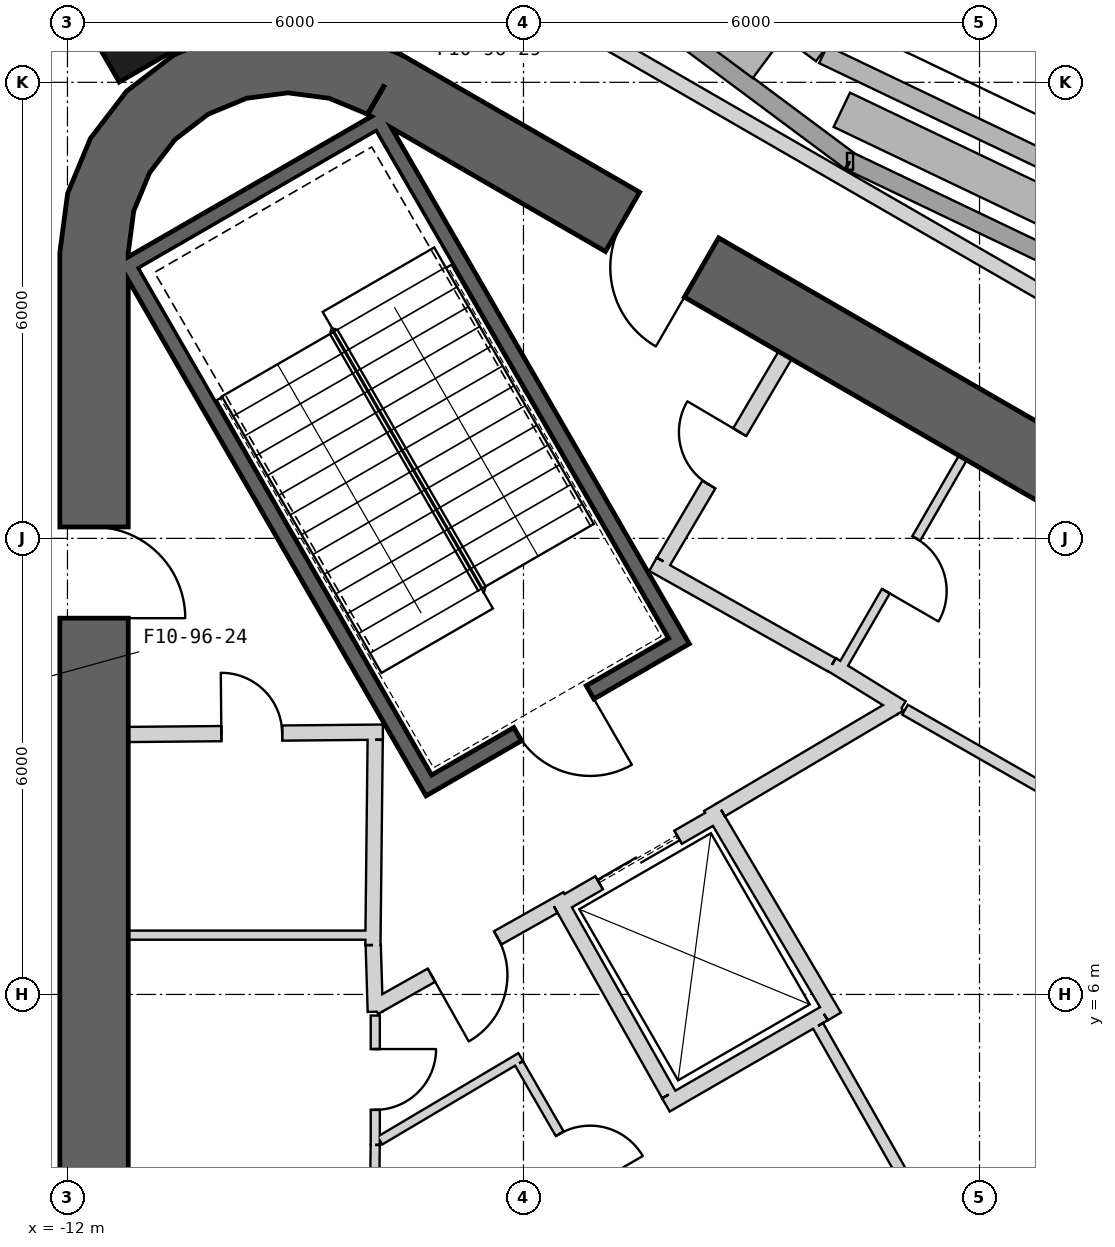
"""IFC4 building model, lengths in metres.
Left out: names, types, materials, properties, quantities, classifications, styles, units other than length and angle.
Written with IfcOpenShell. Run it as: python <this file> out.ifc"""

import sys

from ifc_helpers import new_model, si_unit, direction, frame, frame_2d, origin, origin_2d, place, context, subcontext, project, spatial, polyline, rectangle, outline, extrude, element, fill, save


model = new_model("IFC4")
c1 = context("Model", 3, precision=1e-05, world=origin(), true_north=direction((0.0, 1.0)))
c2 = subcontext(c1, "Body", "Model", "MODEL_VIEW")
j1 = project(units=[si_unit("LENGTHUNIT", "METRE"), si_unit("PLANEANGLEUNIT", "RADIAN")], contexts=[c1])
p1 = place(None, origin())
s1 = spatial("IfcSite", under=j1, at=p1, CompositionType="ELEMENT")
p2 = place(p1, origin())
s2 = spatial("IfcBuilding", under=s1, at=p2, CompositionType="ELEMENT")
p3 = place(p2, frame((0.0, 0.0, 425.3)))
s3 = spatial("IfcBuildingStorey", under=s2, at=p3, CompositionType="ELEMENT", Elevation=425.3)
p4 = place(p3, frame((-11.025, 19.097, -0.25), z_axis=(0.0, 0.0, 1.0), x_axis=(-0.5, 0.866025403784, 0.0)))
e1 = element("IfcColumn", 1, at=p4, inside=s3, PredefinedType="COLUMN", context=c2, shape_type="SweptSolid", body=[
    extrude(rectangle(XDim=1.6, YDim=1.6, at=origin_2d()), origin(), (0.0, 0.0, 1.0), 5.25),
])
p5 = place(p3, frame((19.475, 2.208, 0.0), z_axis=(0.0, 0.0, 1.0), x_axis=(-0.866028369851, 0.499994862586, 0.0)))
e2 = element("IfcWall", 2, at=p5, inside=s3, PredefinedType="SHEAR", context=c2, shape_type="SweptSolid", body=[
    extrude(rectangle(XDim=31.523, YDim=0.9, at=frame_2d((15.762, 0.0))), origin(), (0.0, 0.0, 1.0), 5.0),
])
p6 = place(p5, frame((3.612, 0.0, 0.0)))
e3 = element("IfcOpeningElement", 3, at=p6, cuts=e2, PredefinedType="OPENING", context=c2, shape_type="SweptSolid", body=[
    extrude(rectangle(XDim=1.2, YDim=2.4, at=frame_2d((0.6, 1.2))), frame((0.0, 0.46, 0.0), z_axis=(0.0, -1.0, 0.0), x_axis=(1.0, 0.0, 0.0)), (0.0, 0.0, 1.0), 0.92),
])
p7 = place(p5, frame((26.712, 0.0, 0.0)))
e4 = element("IfcOpeningElement", 4, at=p7, cuts=e2, PredefinedType="OPENING", context=c2, shape_type="SweptSolid", body=[
    extrude(rectangle(XDim=1.2, YDim=2.4, at=frame_2d((0.6, 1.2))), frame((0.0, 0.46, 0.0), z_axis=(0.0, -1.0, 0.0), x_axis=(1.0, 0.0, 0.0)), (0.0, 0.0, 1.0), 0.92),
])
p8 = place(p3, frame((-11.65, 15.762, 0.0), z_axis=(0.0, 0.0, 1.0), x_axis=(0.0, -1.0, 0.0)))
e5 = element("IfcWall", 5, at=p8, inside=s3, PredefinedType="SHEAR", context=c2, shape_type="SweptSolid", body=[
    extrude(rectangle(XDim=31.523, YDim=0.9, at=frame_2d((15.762, 0.0))), origin(), (0.0, 0.0, 1.0), 5.0),
])
p9 = place(p8, frame((3.612, 0.0, 0.0)))
e6 = element("IfcOpeningElement", 6, at=p9, cuts=e5, PredefinedType="OPENING", context=c2, shape_type="SweptSolid", body=[
    extrude(rectangle(XDim=1.2, YDim=2.4, at=frame_2d((0.6, 1.2))), frame((0.0, 0.46, 0.0), z_axis=(0.0, -1.0, 0.0), x_axis=(1.0, 0.0, 0.0)), (0.0, 0.0, 1.0), 0.92),
])
p10 = place(p8, frame((26.712, 0.0, 0.0)))
e7 = element("IfcOpeningElement", 7, at=p10, cuts=e5, PredefinedType="OPENING", context=c2, shape_type="SweptSolid", body=[
    extrude(rectangle(XDim=1.2, YDim=2.4, at=frame_2d((0.6, 1.2))), frame((0.0, 0.46, 0.0), z_axis=(0.0, -1.0, 0.0), x_axis=(1.0, 0.0, 0.0)), (0.0, 0.0, 1.0), 0.92),
])
p11 = place(p3, origin())
e8 = element("IfcWall", 8, at=p11, inside=s3, PredefinedType="SHEAR", context=c2, shape_type="SweptSolid", body=[
    extrude(outline(polyline([(-7.6, 18.36), (-8.323, 18.659), (-9.1, 18.762), (-9.876, 18.659), (-10.6, 18.36), (-11.221, 17.883), (-11.698, 17.262), (-11.998, 16.538), (-12.1, 15.762), (-11.2, 15.762), (-11.128, 16.305), (-10.919, 16.812), (-10.585, 17.247), (-10.15, 17.58), (-9.644, 17.79), (-9.1, 17.862), (-8.556, 17.79), (-8.05, 17.58), (-7.6, 18.36)])), origin(), (0.0, 0.0, 1.0), 5.0),
])
p12 = place(p3, frame((4.314, 14.085, 0.0), z_axis=(0.0, 0.0, 1.0), x_axis=(-0.902315049727, 0.431077198464, 0.0)))
e9 = element("IfcWall", 9, at=p12, inside=s3, PredefinedType="SOLIDWALL", context=c2, shape_type="SweptSolid", body=[
    extrude(rectangle(XDim=6.669, YDim=0.24, at=frame_2d((3.334, 0.0))), origin(), (0.0, 0.0, 1.0), 4.75),
])
p13 = place(p3, frame((-1.703, 16.96, 0.0), z_axis=(0.0, 0.0, 1.0), x_axis=(-0.801994232546, 0.597331776288, 0.0)))
e10 = element("IfcWall", 10, at=p13, inside=s3, PredefinedType="SOLIDWALL", context=c2, shape_type="SweptSolid", body=[
    extrude(rectangle(XDim=6.669, YDim=0.24, at=frame_2d((3.335, 0.0))), origin(), (0.0, 0.0, 1.0), 4.75),
])
p14 = place(p3, frame((-12.094, 20.946, 0.0), z_axis=(0.0, 0.0, 1.0), x_axis=(-0.498950155725, -0.866630683799, 0.0)))
e11 = element("IfcWall", 11, at=p14, inside=s3, PredefinedType="SOLIDWALL", context=c2, shape_type="SweptSolid", body=[
    extrude(rectangle(XDim=5.055, YDim=0.24, at=frame_2d((2.527, 0.0))), origin(), (0.0, 0.0, 1.0), 4.75),
])
p15 = place(p3, frame((-7.914, 22.725, 0.04), z_axis=(0.0, 0.0, 1.0), x_axis=(0.801984295915, -0.597345117253, 0.0)))
e12 = element("IfcWall", 12, at=p15, inside=s3, PredefinedType="PARAPET", context=c2, shape_type="SweptSolid", body=[
    extrude(rectangle(XDim=7.278, YDim=0.25, at=frame_2d((3.639, 0.0))), origin(), (0.0, 0.0, 1.0), 1.2),
])
p16 = place(p3, frame((-2.057, 18.365, 0.04), z_axis=(0.0, 0.0, 1.0), x_axis=(0.90231764466, -0.431071766804, 0.0)))
e13 = element("IfcWall", 13, at=p16, inside=s3, PredefinedType="PARAPET", context=c2, shape_type="SweptSolid", body=[
    extrude(rectangle(XDim=21.975, YDim=0.25, at=frame_2d((10.987, 0.0))), origin(), (0.0, 0.0, 1.0), 1.2),
])
p17 = place(p3, frame((-7.696, 21.877, 0.04), z_axis=(0.0, 0.0, 1.0), x_axis=(0.801981944101, -0.597348274741, 0.0)))
e14 = element("IfcWall", 14, at=p17, inside=s3, PredefinedType="PARAPET", context=c2, shape_type="SweptSolid", body=[
    extrude(rectangle(XDim=6.062, YDim=0.5, at=frame_2d((3.031, 0.0))), origin(), (0.0, 0.0, 1.0), 0.6),
])
p18 = place(p3, frame((-1.812, 17.639, 0.04), z_axis=(0.0, 0.0, 1.0), x_axis=(0.902316498724, -0.431074165463, 0.0)))
e15 = element("IfcWall", 15, at=p18, inside=s3, PredefinedType="PARAPET", context=c2, shape_type="SweptSolid", body=[
    extrude(rectangle(XDim=20.799, YDim=0.5, at=frame_2d((10.399, 0.0))), origin(), (0.0, 0.0, 1.0), 0.6),
])
p19 = place(p3, frame((-11.245, 15.678, -0.25), z_axis=(0.0, 0.0, 1.0), x_axis=(0.499977274689, -0.866038523851, 0.0)))
e16 = element("IfcWall", 16, at=p19, inside=s3, PredefinedType="SHEAR", context=c2, shape_type="SweptSolid", body=[
    extrude(rectangle(XDim=8.1, YDim=0.2, at=frame_2d((4.05, 0.0))), origin(), (0.0, 0.0, 1.0), 5.0),
])
p20 = place(p3, frame((-7.818, 17.541, -0.25), z_axis=(0.0, 0.0, 1.0), x_axis=(-0.866044365799, -0.499967155389, 0.0)))
e17 = element("IfcWall", 17, at=p20, inside=s3, PredefinedType="SHEAR", context=c2, shape_type="SweptSolid", body=[
    extrude(rectangle(XDim=3.8, YDim=0.2, at=frame_2d((1.9, 0.0))), origin(), (0.0, 0.0, 1.0), 5.0),
])
p21 = place(p3, frame((-7.854, 17.405, -0.25), z_axis=(0.0, 0.0, 1.0), x_axis=(0.499997992926, -0.866026562566, 0.0)))
e18 = element("IfcWall", 18, at=p21, inside=s3, PredefinedType="SHEAR", context=c2, shape_type="SweptSolid", body=[
    extrude(rectangle(XDim=7.9, YDim=0.2, at=frame_2d((3.95, 0.0))), origin(), (0.0, 0.0, 1.0), 5.0),
])
p22 = place(p3, frame((-7.159, 8.8, -0.25), z_axis=(0.0, 0.0, 1.0), x_axis=(0.866047807691, 0.499961193289, 0.0)))
e19 = element("IfcWall", 19, at=p22, inside=s3, PredefinedType="SHEAR", context=c2, shape_type="SweptSolid", body=[
    extrude(rectangle(XDim=3.6, YDim=0.2, at=frame_2d((1.8, 0.0))), origin(), (0.0, 0.0, 1.0), 5.0),
])
p23 = place(p22, frame((1.25, 0.0, 0.25)))
e20 = element("IfcOpeningElement", 20, at=p23, cuts=e19, PredefinedType="OPENING", context=c2, shape_type="SweptSolid", body=[
    extrude(rectangle(XDim=1.1, YDim=2.1, at=frame_2d((0.55, 1.05))), frame((0.0, 0.11, 0.0), z_axis=(0.0, -1.0, 0.0), x_axis=(1.0, 0.0, 0.0)), (0.0, 0.0, 1.0), 0.22),
])
p24 = place(p3, frame((-5.524, 7.168, 0.0), z_axis=(0.0, 0.0, 1.0), x_axis=(0.866024647952, 0.500001309137, 0.0)))
e21 = element("IfcWall", 21, at=p24, inside=s3, PredefinedType="PLUMBINGWALL", context=c2, shape_type="SweptSolid", body=[
    extrude(rectangle(XDim=2.4, YDim=0.2, at=frame_2d((1.2, 0.0))), origin(), (0.0, 0.0, 1.0), 4.75),
])
p25 = place(p24, frame((0.6, 0.0, 0.0)))
e22 = element("IfcOpeningElement", 22, at=p25, cuts=e21, PredefinedType="OPENING", context=c2, shape_type="SweptSolid", body=[
    extrude(rectangle(XDim=1.2, YDim=2.4, at=frame_2d((0.6, 1.2))), frame((0.0, 0.11, 0.0), z_axis=(0.0, -1.0, 0.0), x_axis=(1.0, 0.0, 0.0)), (0.0, 0.0, 1.0), 0.22),
])
p26 = place(p3, frame((-3.538, 8.465, 0.0), z_axis=(0.0, 0.0, 1.0), x_axis=(0.508616218331, -0.860993346345, 0.0)))
e23 = element("IfcWall", 23, at=p26, inside=s3, PredefinedType="PLUMBINGWALL", context=c2, shape_type="SweptSolid", body=[
    extrude(rectangle(XDim=3.2, YDim=0.2, at=frame_2d((1.6, 0.0))), origin(), (0.0, 0.0, 1.0), 4.75),
])
p27 = place(p3, frame((-2.047, 5.746, 0.0), z_axis=(0.0, 0.0, 1.0), x_axis=(-0.866024647952, -0.500001309137, 0.0)))
e24 = element("IfcWall", 24, at=p27, inside=s3, PredefinedType="PLUMBINGWALL", context=c2, shape_type="SweptSolid", body=[
    extrude(rectangle(XDim=2.4, YDim=0.2, at=frame_2d((1.2, 0.0))), origin(), (0.0, 0.0, 1.0), 4.75),
])
p28 = place(p3, frame((-5.562, 7.296, 0.0), z_axis=(0.0, 0.0, 1.0), x_axis=(0.49134651263, -0.870964180966, 0.0)))
e25 = element("IfcWall", 25, at=p28, inside=s3, PredefinedType="PLUMBINGWALL", context=c2, shape_type="SweptSolid", body=[
    extrude(rectangle(XDim=3.0, YDim=0.2, at=frame_2d((1.5, 0.0))), origin(), (0.0, 0.0, 1.0), 4.75),
])
p29 = place(p3, frame((-7.95, 6.78, 0.0), z_axis=(0.0, 0.0, 1.0), x_axis=(-1.0, 0.0, 0.0)))
e26 = element("IfcWall", 26, at=p29, inside=s3, PredefinedType="PARTITIONING", context=c2, shape_type="SweptSolid", body=[
    extrude(rectangle(XDim=3.25, YDim=0.12, at=frame_2d((1.625, 0.0))), origin(), (0.0, 0.0, 1.0), 4.75),
])
p30 = place(p3, frame((-7.85, 9.451, 0.0), z_axis=(0.0, 0.0, 1.0), x_axis=(-0.999957167047, -0.009255488683, 0.0)))
e27 = element("IfcWall", 27, at=p30, inside=s3, PredefinedType="PARTITIONING", context=c2, shape_type="SweptSolid", body=[
    extrude(rectangle(XDim=3.35, YDim=0.2, at=frame_2d((1.675, 0.0))), origin(), (0.0, 0.0, 1.0), 4.75),
])
p31 = place(p30, frame((1.325, 0.0, 0.0)))
e28 = element("IfcOpeningElement", 28, at=p31, cuts=e27, PredefinedType="OPENING", context=c2, shape_type="SweptSolid", body=[
    extrude(rectangle(XDim=0.8, YDim=2.1, at=frame_2d((0.4, 1.05))), frame((0.0, 0.11, 0.0), z_axis=(0.0, -1.0, 0.0), x_axis=(1.0, 0.0, 0.0)), (0.0, 0.0, 1.0), 0.22),
])
p32 = place(p3, frame((-7.981, 6.65, 0.0), z_axis=(0.0, 0.0, 1.0), x_axis=(0.011120469654, 0.999938165666, 0.0)))
e29 = element("IfcWall", 29, at=p32, inside=s3, PredefinedType="PARTITIONING", context=c2, shape_type="SweptSolid", body=[
    extrude(rectangle(XDim=2.7, YDim=0.2, at=frame_2d((1.35, 0.0))), origin(), (0.0, 0.0, 1.0), 4.75),
])
p33 = place(p3, frame((-7.95, 5.772, 0.0), z_axis=(0.0, 0.0, 1.0), x_axis=(-0.030861509705, 0.999523670164, 0.0)))
e30 = element("IfcWall", 30, at=p33, inside=s3, PredefinedType="PARTITIONING", context=c2, shape_type="SweptSolid", body=[
    extrude(rectangle(XDim=0.878, YDim=0.2, at=frame_2d((0.439, 0.0))), origin(), (0.0, 0.0, 1.0), 4.75),
])
p34 = place(p3, frame((-7.951, 4.02, 0.0), z_axis=(0.0, 0.0, 1.0), x_axis=(-0.010879853406, -0.999940812643, 0.0)))
e31 = element("IfcWall", 31, at=p34, inside=s3, PredefinedType="PARTITIONING", context=c2, shape_type="SweptSolid", body=[
    extrude(rectangle(XDim=2.67, YDim=0.12, at=frame_2d((1.335, 0.0))), origin(), (0.0, 0.0, 1.0), 4.75),
])
p35 = place(p3, frame((-7.95, 4.02, 0.0), z_axis=(0.0, 0.0, 1.0), x_axis=(0.0, 1.0, 0.0)))
e32 = element("IfcWall", 32, at=p35, inside=s3, PredefinedType="PARTITIONING", context=c2, shape_type="SweptSolid", body=[
    extrude(rectangle(XDim=1.702, YDim=0.12, at=frame_2d((0.851, 0.0))), origin(), (0.0, 0.0, 1.0), 4.75),
])
p36 = place(p35, frame((0.461, 0.0, 0.0)))
e33 = element("IfcOpeningElement", 33, at=p36, cuts=e32, PredefinedType="OPENING", context=c2, shape_type="SweptSolid", body=[
    extrude(rectangle(XDim=0.8, YDim=2.1, at=frame_2d((0.4, 1.05))), frame((0.0, 0.07, 0.0), z_axis=(0.0, -1.0, 0.0), x_axis=(1.0, 0.0, 0.0)), (0.0, 0.0, 1.0), 0.14),
])
p37 = place(p3, frame((-0.22, 13.06, 0.0), z_axis=(0.0, 0.0, 1.0), x_axis=(-0.499984717929, -0.866034226713, 0.0)))
e34 = element("IfcWall", 34, at=p37, inside=s3, PredefinedType="PARTITIONING", context=c2, shape_type="SweptSolid", body=[
    extrude(rectangle(XDim=3.25, YDim=0.12, at=frame_2d((1.625, 0.0))), origin(), (0.0, 0.0, 1.0), 4.75),
])
p38 = place(p37, frame((1.225, 0.0, 0.0)))
e35 = element("IfcOpeningElement", 35, at=p38, cuts=e34, PredefinedType="OPENING", context=c2, shape_type="SweptSolid", body=[
    extrude(rectangle(XDim=0.8, YDim=2.1, at=frame_2d((0.4, 1.05))), frame((0.0, 0.07, 0.0), z_axis=(0.0, -1.0, 0.0), x_axis=(1.0, 0.0, 0.0)), (0.0, 0.0, 1.0), 0.14),
])
p39 = place(p3, frame((-1.941, 10.339, 0.0), z_axis=(0.0, 0.0, 1.0), x_axis=(0.850216889117, -0.526432561171, 0.0)))
e36 = element("IfcWall", 36, at=p39, inside=s3, PredefinedType="PARTITIONING", context=c2, shape_type="SweptSolid", body=[
    extrude(rectangle(XDim=1.078, YDim=0.2, at=frame_2d((0.539, 0.0))), origin(), (0.0, 0.0, 1.0), 4.75),
])
p40 = place(p3, frame((5.159, 6.236, 0.0), z_axis=(0.0, 0.0, 1.0), x_axis=(-0.868105023632, 0.496380567654, 0.0)))
e37 = element("IfcWall", 37, at=p40, inside=s3, PredefinedType="PLUMBINGWALL", context=c2, shape_type="SweptSolid", body=[
    extrude(rectangle(XDim=7.072, YDim=0.15, at=frame_2d((3.536, 0.0))), origin(), (0.0, 0.0, 1.0), 4.75),
])
p41 = place(p3, frame((-4.296, 11.659, 0.0), z_axis=(0.0, 0.0, 1.0), x_axis=(0.871534483978, -0.490334215854, 0.0)))
e38 = element("IfcWall", 38, at=p41, inside=s3, PredefinedType="PARTITIONING", context=c2, shape_type="SweptSolid", body=[
    extrude(rectangle(XDim=2.7, YDim=0.2, at=frame_2d((1.35, 0.0))), origin(), (0.0, 0.0, 1.0), 4.75),
])
p42 = place(p3, frame((-2.558, 14.409, 0.0), z_axis=(0.0, 0.0, 1.0), x_axis=(-0.508018930956, -0.861345903683, 0.0)))
e39 = element("IfcWall", 39, at=p42, inside=s3, PredefinedType="PARTITIONING", context=c2, shape_type="SweptSolid", body=[
    extrude(rectangle(XDim=3.15, YDim=0.2, at=frame_2d((1.575, 0.0))), origin(), (0.0, 0.0, 1.0), 4.75),
])
p43 = place(p42, frame((1.175, 0.0, 0.0)))
e40 = element("IfcOpeningElement", 40, at=p43, cuts=e39, PredefinedType="OPENING", context=c2, shape_type="SweptSolid", body=[
    extrude(rectangle(XDim=0.8, YDim=2.1, at=frame_2d((0.4, 1.05))), frame((0.0, 0.11, 0.0), z_axis=(0.0, -1.0, 0.0), x_axis=(1.0, 0.0, 0.0)), (0.0, 0.0, 1.0), 0.22),
])
p44 = place(p3, frame((-1.055, 9.818, 0.0), z_axis=(0.0, 0.0, 1.0), x_axis=(-0.860614334655, -0.50925726994, 0.0)))
e41 = element("IfcWall", 41, at=p44, inside=s3, PredefinedType="PARTITIONING", context=c2, shape_type="SweptSolid", body=[
    extrude(rectangle(XDim=2.726, YDim=0.2, at=frame_2d((1.363, 0.0))), origin(), (0.0, 0.0, 1.0), 4.75),
])
p45 = place(p3, frame((-5.6, 7.16, 0.0), z_axis=(0.0, 0.0, 1.0), x_axis=(-0.871337173459, -0.490684756385, 0.0)))
e42 = element("IfcWall", 42, at=p45, inside=s3, PredefinedType="PARTITIONING", context=c2, shape_type="SweptSolid", body=[
    extrude(rectangle(XDim=2.709, YDim=0.2, at=frame_2d((1.354, 0.0))), origin(), (0.0, 0.0, 1.0), 4.75),
])
p46 = place(p45, frame((0.848, 0.0, 0.0)))
e43 = element("IfcOpeningElement", 43, at=p46, cuts=e42, PredefinedType="OPENING", context=c2, shape_type="SweptSolid", body=[
    extrude(rectangle(XDim=1.0, YDim=2.1, at=frame_2d((0.5, 1.05))), frame((0.0, 0.11, 0.0), z_axis=(0.0, -1.0, 0.0), x_axis=(1.0, 0.0, 0.0)), (0.0, 0.0, 1.0), 0.22),
])
p47 = place(p3, frame((-2.124, 5.586, 0.0), z_axis=(0.0, 0.0, 1.0), x_axis=(0.494084527552, -0.869413871314, 0.0)))
e44 = element("IfcWall", 44, at=p47, inside=s3, PredefinedType="PLUMBINGWALL", context=c2, shape_type="SweptSolid", body=[
    extrude(rectangle(XDim=4.188, YDim=0.15, at=frame_2d((2.094, 0.0))), origin(), (0.0, 0.0, 1.0), 4.75),
])
p48 = place(p3, frame((-6.037, 5.176, 0.0), z_axis=(0.0, 0.0, 1.0), x_axis=(-0.860081621619, -0.510156450663, 0.0)))
e45 = element("IfcWall", 45, at=p48, inside=s3, PredefinedType="PARTITIONING", context=c2, shape_type="SweptSolid", body=[
    extrude(rectangle(XDim=2.155, YDim=0.12, at=frame_2d((1.077, 0.0))), origin(), (0.0, 0.0, 1.0), 4.75),
])
p49 = place(p3, frame((-4.558, 2.495, 0.0), z_axis=(0.0, 0.0, 1.0), x_axis=(-0.499990139034, 0.866031096941, 0.0)))
e46 = element("IfcWall", 46, at=p49, inside=s3, PredefinedType="PARTITIONING", context=c2, shape_type="SweptSolid", body=[
    extrude(rectangle(XDim=3.0, YDim=0.12, at=frame_2d((1.5, 0.0))), origin(), (0.0, 0.0, 1.0), 4.75),
])
p50 = place(p49, frame((1.13, 0.0, 0.0)))
e47 = element("IfcOpeningElement", 47, at=p50, cuts=e46, PredefinedType="OPENING", context=c2, shape_type="SweptSolid", body=[
    extrude(rectangle(XDim=0.8, YDim=2.1, at=frame_2d((0.4, 1.05))), frame((0.0, 0.07, 0.0), z_axis=(0.0, -1.0, 0.0), x_axis=(1.0, 0.0, 0.0)), (0.0, 0.0, 1.0), 0.14),
])
p51 = place(p3, frame((4.034, 13.375, 0.0), z_axis=(0.0, 0.0, 1.0), x_axis=(-0.866024064453, 0.500002319783, 0.0)))
e48 = element("IfcWall", 48, at=p51, inside=s3, PredefinedType="PARTITIONING", context=c2, shape_type="SweptSolid", body=[
    extrude(rectangle(XDim=12.812, YDim=0.2, at=frame_2d((6.406, 0.0))), origin(), (0.0, 0.0, 1.0), 4.75),
])
p52 = place(p51, frame((11.612, 0.0, 0.0)))
e49 = element("IfcOpeningElement", 49, at=p52, cuts=e48, PredefinedType="OPENING", context=c2, shape_type="SweptSolid", body=[
    extrude(rectangle(XDim=1.0, YDim=2.1, at=frame_2d((0.5, 1.05))), frame((0.0, 0.11, 0.0), z_axis=(0.0, -1.0, 0.0), x_axis=(1.0, 0.0, 0.0)), (0.0, 0.0, 1.0), 0.22),
])
p53 = place(p23, origin())
e50 = element("IfcDoor", 50, at=p53, inside=s3, OperationType="SINGLE_SWING_RIGHT", PredefinedType="USERDEFINED", context=c2, shape_type="SweptSolid", body=[
    extrude(rectangle(XDim=1.1, YDim=2.1, at=frame_2d((0.55, 1.05))), frame((0.0, 0.025, 0.0), z_axis=(0.0, -1.0, 0.0), x_axis=(1.0, 0.0, 0.0)), (0.0, 0.0, 1.0), 0.05),
])
fill(e20, e50)
p54 = place(p46, origin())
e51 = element("IfcDoor", 51, at=p54, inside=s3, OperationType="SINGLE_SWING_RIGHT", PredefinedType="USERDEFINED", context=c2, shape_type="SweptSolid", body=[
    extrude(rectangle(XDim=1.0, YDim=2.1, at=frame_2d((0.5, 1.05))), frame((0.0, 0.025, 0.0), z_axis=(0.0, -1.0, 0.0), x_axis=(1.0, 0.0, 0.0)), (0.0, 0.0, 1.0), 0.05),
])
fill(e43, e51)
p55 = place(p25, origin())
e52 = element("IfcDoor", 52, at=p55, inside=s3, OperationType="SLIDING_TO_LEFT", PredefinedType="USERDEFINED", context=c2, shape_type="SweptSolid", body=[
    extrude(rectangle(XDim=1.2, YDim=2.4, at=frame_2d((0.6, 1.2))), frame((0.0, 0.025, 0.0), z_axis=(0.0, -1.0, 0.0), x_axis=(1.0, 0.0, 0.0)), (0.0, 0.0, 1.0), 0.05),
])
fill(e22, e52)
p56 = place(p50, origin())
e53 = element("IfcDoor", 53, at=p56, inside=s3, OperationType="SINGLE_SWING_LEFT", PredefinedType="USERDEFINED", context=c2, shape_type="SweptSolid", body=[
    extrude(rectangle(XDim=0.8, YDim=2.1, at=frame_2d((0.4, 1.05))), frame((0.0, 0.025, 0.0), z_axis=(0.0, -1.0, 0.0), x_axis=(1.0, 0.0, 0.0)), (0.0, 0.0, 1.0), 0.05),
])
fill(e47, e53)
p57 = place(p31, origin())
e54 = element("IfcDoor", 54, at=p57, inside=s3, OperationType="SINGLE_SWING_RIGHT", PredefinedType="USERDEFINED", context=c2, shape_type="SweptSolid", body=[
    extrude(rectangle(XDim=0.8, YDim=2.1, at=frame_2d((0.4, 1.05))), frame((0.0, 0.025, 0.0), z_axis=(0.0, -1.0, 0.0), x_axis=(1.0, 0.0, 0.0)), (0.0, 0.0, 1.0), 0.05),
])
fill(e28, e54)
p58 = place(p36, origin())
e55 = element("IfcDoor", 55, at=p58, inside=s3, OperationType="SINGLE_SWING_RIGHT", PredefinedType="USERDEFINED", context=c2, shape_type="SweptSolid", body=[
    extrude(rectangle(XDim=0.8, YDim=2.1, at=frame_2d((0.4, 1.05))), frame((0.0, 0.025, 0.0), z_axis=(0.0, -1.0, 0.0), x_axis=(1.0, 0.0, 0.0)), (0.0, 0.0, 1.0), 0.05),
])
fill(e33, e55)
p59 = place(p43, origin())
e56 = element("IfcDoor", 56, at=p59, inside=s3, OperationType="SINGLE_SWING_LEFT", PredefinedType="USERDEFINED", context=c2, shape_type="SweptSolid", body=[
    extrude(rectangle(XDim=0.8, YDim=2.1, at=frame_2d((0.4, 1.05))), frame((0.0, 0.025, 0.0), z_axis=(0.0, -1.0, 0.0), x_axis=(1.0, 0.0, 0.0)), (0.0, 0.0, 1.0), 0.05),
])
fill(e40, e56)
p60 = place(p38, origin())
e57 = element("IfcDoor", 57, at=p60, inside=s3, OperationType="SINGLE_SWING_RIGHT", PredefinedType="USERDEFINED", context=c2, shape_type="SweptSolid", body=[
    extrude(rectangle(XDim=0.8, YDim=2.1, at=frame_2d((0.4, 1.05))), frame((0.0, 0.025, 0.0), z_axis=(0.0, -1.0, 0.0), x_axis=(1.0, 0.0, 0.0)), (0.0, 0.0, 1.0), 0.05),
])
fill(e35, e57)
p61 = place(p7, origin())
e58 = element("IfcDoor", 58, at=p61, inside=s3, OperationType="SINGLE_SWING_LEFT", PredefinedType="USERDEFINED", context=c2, shape_type="SweptSolid", body=[
    extrude(rectangle(XDim=1.2, YDim=2.4, at=frame_2d((0.6, 1.2))), frame((0.0, 0.025, 0.0), z_axis=(0.0, -1.0, 0.0), x_axis=(1.0, 0.0, 0.0)), (0.0, 0.0, 1.0), 0.05),
])
fill(e4, e58)
p62 = place(p9, origin())
e59 = element("IfcDoor", 59, at=p62, inside=s3, OperationType="SINGLE_SWING_RIGHT", PredefinedType="USERDEFINED", context=c2, shape_type="SweptSolid", body=[
    extrude(rectangle(XDim=1.2, YDim=2.4, at=frame_2d((0.6, 1.2))), frame((0.0, 0.025, 0.0), z_axis=(0.0, -1.0, 0.0), x_axis=(1.0, 0.0, 0.0)), (0.0, 0.0, 1.0), 0.05),
])
fill(e6, e59)
save(model, sys.argv[1])
